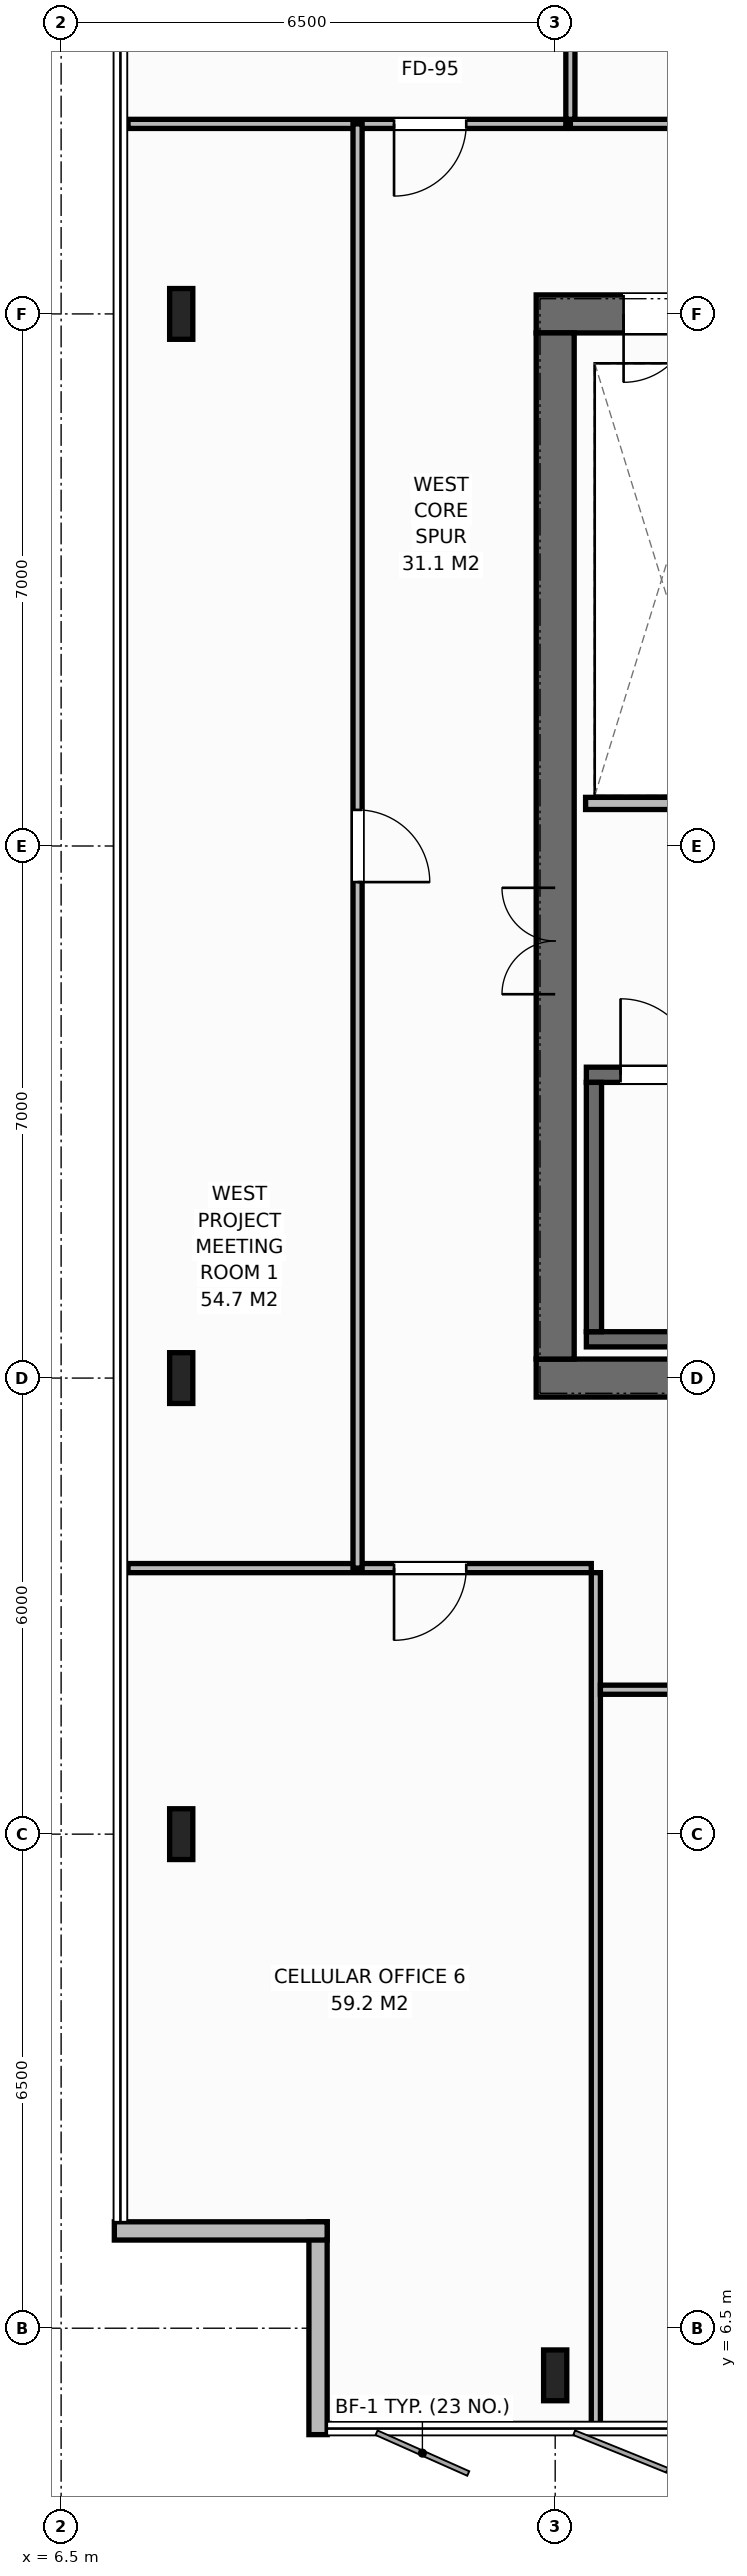
"""IFC4 building model, lengths in metres.
Left out: names, types, materials, properties, quantities, classifications, styles, units other than length and angle.
Written with IfcOpenShell. Run it as: python <this file> out.ifc"""

import sys

from ifc_helpers import new_model, si_unit, direction, frame, frame_2d, origin, origin_2d, place, context, subcontext, project, spatial, rectangle, i_section, extrude, element, fill, save


model = new_model("IFC4")
c1 = context("Model", 3, precision=1e-05, world=origin(), true_north=direction((0.0, 1.0)))
c2 = subcontext(c1, "Body", "Model", "MODEL_VIEW")
j1 = project(units=[si_unit("LENGTHUNIT", "METRE"), si_unit("PLANEANGLEUNIT", "RADIAN")], contexts=[c1])
p1 = place(None, origin())
s1 = spatial("IfcSite", under=j1, at=p1, CompositionType="ELEMENT")
p2 = place(p1, origin())
s2 = spatial("IfcBuilding", under=s1, at=p2, CompositionType="ELEMENT")
p3 = place(p2, frame((0.0, 0.0, 306.4)))
s3 = spatial("IfcBuildingStorey", under=s2, at=p3, CompositionType="ELEMENT", Elevation=306.4)
p4 = place(p3, frame((12.75, 19.0, 0.0), z_axis=(0.0, 0.0, 1.0), x_axis=(1.0, 0.0, 0.0)))
e1 = element("IfcWall", 1, at=p4, inside=s3, PredefinedType="SHEAR", context=c2, shape_type="SweptSolid", body=[
    extrude(rectangle(XDim=13.5, YDim=0.5, at=frame_2d((6.75, 0.0))), origin(), (0.0, 0.0, 1.0), 4.0),
])
p5 = place(p4, frame((9.13, 0.0, 0.0)))
e2 = element("IfcOpeningElement", 2, at=p5, cuts=e1, PredefinedType="OPENING", context=c2, shape_type="SweptSolid", body=[
    extrude(rectangle(XDim=1.4, YDim=2.2, at=frame_2d((0.7, 1.1))), frame((0.0, 0.26, 0.0), z_axis=(0.0, -1.0, 0.0), x_axis=(1.0, 0.0, 0.0)), (0.0, 0.0, 1.0), 0.52),
])
p6 = place(p3, frame((12.75, 33.0, 0.0), z_axis=(0.0, 0.0, 1.0), x_axis=(1.0, 0.0, 0.0)))
e3 = element("IfcWall", 3, at=p6, inside=s3, PredefinedType="SHEAR", context=c2, shape_type="SweptSolid", body=[
    extrude(rectangle(XDim=13.5, YDim=0.5, at=frame_2d((6.75, 0.0))), origin(), (0.0, 0.0, 1.0), 4.0),
])
p7 = place(p6, frame((1.15, 0.0, 0.0)))
e4 = element("IfcOpeningElement", 4, at=p7, cuts=e3, PredefinedType="OPENING", context=c2, shape_type="SweptSolid", body=[
    extrude(rectangle(XDim=0.9, YDim=2.15, at=frame_2d((0.45, 1.075))), frame((0.0, 0.26, 0.0), z_axis=(0.0, -1.0, 0.0), x_axis=(1.0, 0.0, 0.0)), (0.0, 0.0, 1.0), 0.52),
])
p8 = place(p6, frame((3.2, 0.0, 0.0)))
e5 = element("IfcOpeningElement", 5, at=p8, cuts=e3, PredefinedType="OPENING", context=c2, shape_type="SweptSolid", body=[
    extrude(rectangle(XDim=0.95, YDim=2.15, at=frame_2d((0.475, 1.075))), frame((0.0, 0.26, 0.0), z_axis=(0.0, -1.0, 0.0), x_axis=(1.0, 0.0, 0.0)), (0.0, 0.0, 1.0), 0.52),
])
p9 = place(p6, frame((6.05, 0.0, 0.0)))
e6 = element("IfcOpeningElement", 6, at=p9, cuts=e3, PredefinedType="OPENING", context=c2, shape_type="SweptSolid", body=[
    extrude(rectangle(XDim=0.95, YDim=2.15, at=frame_2d((0.475, 1.075))), frame((0.0, 0.26, 0.0), z_axis=(0.0, -1.0, 0.0), x_axis=(1.0, 0.0, 0.0)), (0.0, 0.0, 1.0), 0.52),
])
p10 = place(p6, frame((9.13, 0.0, 0.0)))
e7 = element("IfcOpeningElement", 7, at=p10, cuts=e3, PredefinedType="OPENING", context=c2, shape_type="SweptSolid", body=[
    extrude(rectangle(XDim=1.4, YDim=2.2, at=frame_2d((0.7, 1.1))), frame((0.0, 0.26, 0.0), z_axis=(0.0, -1.0, 0.0), x_axis=(1.0, 0.0, 0.0)), (0.0, 0.0, 1.0), 0.52),
])
p11 = place(p3, frame((13.0, 19.25, 0.0), z_axis=(0.0, 0.0, 1.0), x_axis=(0.0, 1.0, 0.0)))
e8 = element("IfcWall", 8, at=p11, inside=s3, PredefinedType="SHEAR", context=c2, shape_type="SweptSolid", body=[
    extrude(rectangle(XDim=13.5, YDim=0.5, at=frame_2d((6.75, 0.0))), origin(), (0.0, 0.0, 1.0), 4.0),
])
p12 = place(p11, frame((4.8, 0.0, 0.0)))
e9 = element("IfcOpeningElement", 9, at=p12, cuts=e8, PredefinedType="OPENING", context=c2, shape_type="SweptSolid", body=[
    extrude(rectangle(XDim=1.4, YDim=2.2, at=frame_2d((0.7, 1.1))), frame((0.0, 0.26, 0.0), z_axis=(0.0, -1.0, 0.0), x_axis=(1.0, 0.0, 0.0)), (0.0, 0.0, 1.0), 0.52),
])
p13 = place(p3, frame((13.41, 19.51, 0.0), z_axis=(0.0, 0.0, 1.0), x_axis=(1.0, 0.0, 0.0)))
e10 = element("IfcWall", 10, at=p13, inside=s3, PredefinedType="SHEAR", context=c2, shape_type="SweptSolid", body=[
    extrude(rectangle(XDim=8.43, YDim=0.2, at=frame_2d((4.215, 0.0))), origin(), (0.0, 0.0, 1.0), 4.0),
])
p14 = place(p3, frame((13.41, 22.99, 0.0), z_axis=(0.0, 0.0, 1.0), x_axis=(1.0, 0.0, 0.0)))
e11 = element("IfcWall", 11, at=p14, inside=s3, PredefinedType="SHEAR", context=c2, shape_type="SweptSolid", body=[
    extrude(rectangle(XDim=8.43, YDim=0.2, at=frame_2d((4.215, 0.0))), origin(), (0.0, 0.0, 1.0), 4.0),
])
p15 = place(p14, frame((0.45, 0.0, 0.0)))
e12 = element("IfcOpeningElement", 12, at=p15, cuts=e11, PredefinedType="OPENING", context=c2, shape_type="SweptSolid", body=[
    extrude(rectangle(XDim=1.0, YDim=2.15, at=frame_2d((0.5, 1.075))), frame((0.0, 0.11, 0.0), z_axis=(0.0, -1.0, 0.0), x_axis=(1.0, 0.0, 0.0)), (0.0, 0.0, 1.0), 0.22),
])
p16 = place(p3, frame((13.51, 19.61, 0.0), z_axis=(0.0, 0.0, 1.0), x_axis=(0.0, 1.0, 0.0)))
e13 = element("IfcWall", 13, at=p16, inside=s3, PredefinedType="SHEAR", context=c2, shape_type="SweptSolid", body=[
    extrude(rectangle(XDim=3.28, YDim=0.2, at=frame_2d((1.64, 0.0))), origin(), (0.0, 0.0, 1.0), 4.0),
])
for number, where, z_axis, x_axis in (
    (14, (13.0, 5.88, 0.0), (0.0, 0.0, 1.0), (1.0, 0.0, 0.0)),
    (15, (8.08, 13.0, 0.0), (0.0, 0.0, 1.0), (1.0, 0.0, 0.0)),
    (16, (8.08, 19.0, 0.0), (0.0, 0.0, 1.0), (1.0, 0.0, 0.0)),
    (17, (8.08, 33.0, 0.0), (0.0, 0.0, 1.0), (1.0, 0.0, 0.0)),
):
    element("IfcColumn", number, at=place(p3, frame(where, z_axis=z_axis, x_axis=x_axis)), inside=s3, PredefinedType="COLUMN", context=c2, shape_type="SweptSolid", body=[
        extrude(i_section(OverallWidth=0.305, OverallDepth=0.668, WebThickness=0.021, FlangeThickness=0.04, at=origin_2d()), origin(), (0.0, 0.0, 1.0), 4.0),
    ])
p17 = place(p3, frame((9.88, 5.1, 0.0), z_axis=(0.0, 0.0, 1.0), x_axis=(0.0, 1.0, 0.0)))
e18 = element("IfcWall", 18, at=p17, inside=s3, PredefinedType="STANDARD", context=c2, shape_type="SweptSolid", body=[
    extrude(rectangle(XDim=2.8, YDim=0.24, at=frame_2d((1.4, 0.0))), origin(), (0.0, 0.0, 1.0), 3.72),
])
p18 = place(p3, frame((10.0, 7.78, 0.0), z_axis=(0.0, 0.0, 1.0), x_axis=(-1.0, 0.0, 0.0)))
e19 = element("IfcWall", 19, at=p18, inside=s3, PredefinedType="STANDARD", context=c2, shape_type="SweptSolid", body=[
    extrude(rectangle(XDim=2.8, YDim=0.24, at=frame_2d((1.4, 0.0))), origin(), (0.0, 0.0, 1.0), 3.72),
])
p19 = place(p3, frame((13.4, 26.56, 0.0), z_axis=(0.0, 0.0, 1.0), x_axis=(1.0, 0.0, 0.0)))
e20 = element("IfcWall", 20, at=p19, inside=s3, PredefinedType="STANDARD", context=c2, shape_type="SweptSolid", body=[
    extrude(rectangle(XDim=8.34, YDim=0.16, at=frame_2d((4.17, 0.0))), origin(), (0.0, 0.0, 1.0), 3.72),
])
p20 = place(p3, frame((13.2, 35.5, 0.0), z_axis=(0.0, 0.0, 1.0), x_axis=(1.0, 0.0, 0.0)))
e21 = element("IfcWall", 21, at=p20, inside=s3, PredefinedType="PARTITIONING", context=c2, shape_type="SweptSolid", body=[
    extrude(rectangle(XDim=13.16, YDim=0.12, at=frame_2d((6.58, 0.0))), origin(), (0.0, 0.0, 1.0), 3.72),
])
p21 = place(p20, frame((1.35, 0.0, 0.0)))
e22 = element("IfcOpeningElement", 22, at=p21, cuts=e21, PredefinedType="OPENING", context=c2, shape_type="SweptSolid", body=[
    extrude(rectangle(XDim=0.9, YDim=2.15, at=frame_2d((0.45, 1.075))), frame((0.0, 0.07, 0.0), z_axis=(0.0, -1.0, 0.0), x_axis=(1.0, 0.0, 0.0)), (0.0, 0.0, 1.0), 0.14),
])
p22 = place(p20, frame((4.05, 0.0, 0.0)))
e23 = element("IfcOpeningElement", 23, at=p22, cuts=e21, PredefinedType="OPENING", context=c2, shape_type="SweptSolid", body=[
    extrude(rectangle(XDim=0.9, YDim=2.15, at=frame_2d((0.45, 1.075))), frame((0.0, 0.07, 0.0), z_axis=(0.0, -1.0, 0.0), x_axis=(1.0, 0.0, 0.0)), (0.0, 0.0, 1.0), 0.14),
])
p23 = place(p20, frame((8.25, 0.0, 0.0)))
e24 = element("IfcOpeningElement", 24, at=p23, cuts=e21, PredefinedType="OPENING", context=c2, shape_type="SweptSolid", body=[
    extrude(rectangle(XDim=0.9, YDim=2.15, at=frame_2d((0.45, 1.075))), frame((0.0, 0.07, 0.0), z_axis=(0.0, -1.0, 0.0), x_axis=(1.0, 0.0, 0.0)), (0.0, 0.0, 1.0), 0.14),
])
p24 = place(p20, frame((11.0, 0.0, 0.0)))
e25 = element("IfcOpeningElement", 25, at=p24, cuts=e21, PredefinedType="OPENING", context=c2, shape_type="SweptSolid", body=[
    extrude(rectangle(XDim=0.95, YDim=2.15, at=frame_2d((0.475, 1.075))), frame((0.0, 0.07, 0.0), z_axis=(0.0, -1.0, 0.0), x_axis=(1.0, 0.0, 0.0)), (0.0, 0.0, 1.0), 0.14),
])
p25 = place(p3, frame((13.2, 35.56, 0.0), z_axis=(0.0, 0.0, 1.0), x_axis=(0.0, 1.0, 0.0)))
e26 = element("IfcWall", 26, at=p25, inside=s3, PredefinedType="PARTITIONING", context=c2, shape_type="SweptSolid", body=[
    extrude(rectangle(XDim=11.32, YDim=0.12, at=frame_2d((5.66, 0.0))), origin(), (0.0, 0.0, 1.0), 2.712),
])
p26 = place(p3, frame((7.38, 35.5, 0.0), z_axis=(0.0, 0.0, 1.0), x_axis=(1.0, 0.0, 0.0)))
e27 = element("IfcWall", 27, at=p26, inside=s3, PredefinedType="PARTITIONING", context=c2, shape_type="SweptSolid", body=[
    extrude(rectangle(XDim=5.76, YDim=0.12, at=frame_2d((2.88, 0.0))), origin(), (0.0, 0.0, 1.0), 3.72),
])
p27 = place(p26, frame((3.5, 0.0, 0.0)))
e28 = element("IfcOpeningElement", 28, at=p27, cuts=e27, PredefinedType="OPENING", context=c2, shape_type="SweptSolid", body=[
    extrude(rectangle(XDim=0.95, YDim=2.15, at=frame_2d((0.475, 1.075))), frame((0.0, 0.07, 0.0), z_axis=(0.0, -1.0, 0.0), x_axis=(1.0, 0.0, 0.0)), (0.0, 0.0, 1.0), 0.14),
])
p28 = place(p3, frame((13.535, 5.12, 0.0), z_axis=(0.0, 0.0, 1.0), x_axis=(0.0, 1.0, 0.0)))
e29 = element("IfcWall", 29, at=p28, inside=s3, PredefinedType="PARTITIONING", context=c2, shape_type="SweptSolid", body=[
    extrude(rectangle(XDim=11.32, YDim=0.12, at=frame_2d((5.66, 0.0))), origin(), (0.0, 0.0, 1.0), 3.72),
])
p29 = place(p3, frame((7.38, 16.5, 0.0), z_axis=(0.0, 0.0, 1.0), x_axis=(1.0, 0.0, 0.0)))
e30 = element("IfcWall", 30, at=p29, inside=s3, PredefinedType="PARTITIONING", context=c2, shape_type="SweptSolid", body=[
    extrude(rectangle(XDim=6.095, YDim=0.12, at=frame_2d((3.048, 0.0))), origin(), (0.0, 0.0, 1.0), 3.72),
])
p30 = place(p29, frame((3.5, 0.0, 0.0)))
e31 = element("IfcOpeningElement", 31, at=p30, cuts=e30, PredefinedType="OPENING", context=c2, shape_type="SweptSolid", body=[
    extrude(rectangle(XDim=0.95, YDim=2.15, at=frame_2d((0.475, 1.075))), frame((0.0, 0.07, 0.0), z_axis=(0.0, -1.0, 0.0), x_axis=(1.0, 0.0, 0.0)), (0.0, 0.0, 1.0), 0.14),
])
p31 = place(p3, frame((13.595, 14.9, 0.0), z_axis=(0.0, 0.0, 1.0), x_axis=(1.0, 0.0, 0.0)))
e32 = element("IfcWall", 32, at=p31, inside=s3, PredefinedType="PARTITIONING", context=c2, shape_type="SweptSolid", body=[
    extrude(rectangle(XDim=4.578, YDim=0.12, at=frame_2d((2.289, 0.0))), origin(), (0.0, 0.0, 1.0), 3.72),
])
p32 = place(p31, frame((1.814, 0.0, 0.0)))
e33 = element("IfcOpeningElement", 33, at=p32, cuts=e32, PredefinedType="OPENING", context=c2, shape_type="SweptSolid", body=[
    extrude(rectangle(XDim=0.95, YDim=2.15, at=frame_2d((0.475, 1.075))), frame((0.0, 0.07, 0.0), z_axis=(0.0, -1.0, 0.0), x_axis=(1.0, 0.0, 0.0)), (0.0, 0.0, 1.0), 0.14),
])
p33 = place(p3, frame((10.4, 16.5, 0.0), z_axis=(0.0, 0.0, 1.0), x_axis=(0.0, 1.0, 0.0)))
e34 = element("IfcWall", 34, at=p33, inside=s3, PredefinedType="PARTITIONING", context=c2, shape_type="SweptSolid", body=[
    extrude(rectangle(XDim=19.0, YDim=0.12, at=frame_2d((9.5, 0.0))), origin(), (0.0, 0.0, 1.0), 3.72),
])
p34 = place(p33, frame((9.025, 0.0, 0.0)))
e35 = element("IfcOpeningElement", 35, at=p34, cuts=e34, PredefinedType="OPENING", context=c2, shape_type="SweptSolid", body=[
    extrude(rectangle(XDim=0.95, YDim=2.15, at=frame_2d((0.475, 1.075))), frame((0.0, 0.07, 0.0), z_axis=(0.0, -1.0, 0.0), x_axis=(1.0, 0.0, 0.0)), (0.0, 0.0, 1.0), 0.14),
])
p35 = place(p15, origin())
e36 = element("IfcDoor", 36, at=p35, inside=s3, OperationType="SINGLE_SWING_LEFT", PredefinedType="DOOR", context=c2, shape_type="SweptSolid", body=[
    extrude(rectangle(XDim=1.0, YDim=2.15, at=frame_2d((0.5, 1.075))), frame((0.0, 0.025, 0.0), z_axis=(0.0, -1.0, 0.0), x_axis=(1.0, 0.0, 0.0)), (0.0, 0.0, 1.0), 0.05),
])
fill(e12, e36)
p36 = place(p12, origin())
e37 = element("IfcDoor", 37, at=p36, inside=s3, OperationType="DOUBLE_DOOR_SINGLE_SWING", PredefinedType="DOOR", context=c2, shape_type="SweptSolid", body=[
    extrude(rectangle(XDim=1.4, YDim=2.2, at=frame_2d((0.7, 1.1))), frame((0.0, 0.025, 0.0), z_axis=(0.0, -1.0, 0.0), x_axis=(1.0, 0.0, 0.0)), (0.0, 0.0, 1.0), 0.05),
])
fill(e9, e37)
p37 = place(p7, origin())
e38 = element("IfcDoor", 38, at=p37, inside=s3, OperationType="SINGLE_SWING_RIGHT", PredefinedType="DOOR", context=c2, shape_type="SweptSolid", body=[
    extrude(rectangle(XDim=0.9, YDim=2.15, at=frame_2d((0.45, 1.075))), frame((0.0, -0.025, 0.0), z_axis=(0.0, -1.0, 0.0), x_axis=(1.0, 0.0, 0.0)), (0.0, 0.0, 1.0), 0.05),
])
fill(e4, e38)
p38 = place(p27, origin())
e39 = element("IfcDoor", 39, at=p38, inside=s3, OperationType="SINGLE_SWING_RIGHT", PredefinedType="DOOR", context=c2, shape_type="SweptSolid", body=[
    extrude(rectangle(XDim=0.95, YDim=2.15, at=frame_2d((0.475, 1.075))), frame((0.0, 0.025, 0.0), z_axis=(0.0, -1.0, 0.0), x_axis=(1.0, 0.0, 0.0)), (0.0, 0.0, 1.0), 0.05),
])
fill(e28, e39)
p39 = place(p30, origin())
e40 = element("IfcDoor", 40, at=p39, inside=s3, OperationType="SINGLE_SWING_RIGHT", PredefinedType="DOOR", context=c2, shape_type="SweptSolid", body=[
    extrude(rectangle(XDim=0.95, YDim=2.15, at=frame_2d((0.475, 1.075))), frame((0.0, 0.025, 0.0), z_axis=(0.0, -1.0, 0.0), x_axis=(1.0, 0.0, 0.0)), (0.0, 0.0, 1.0), 0.05),
])
fill(e31, e40)
p40 = place(p34, origin())
e41 = element("IfcDoor", 41, at=p40, inside=s3, OperationType="SINGLE_SWING_RIGHT", PredefinedType="DOOR", context=c2, shape_type="SweptSolid", body=[
    extrude(rectangle(XDim=0.95, YDim=2.15, at=frame_2d((0.475, 1.075))), frame((0.0, 0.025, 0.0), z_axis=(0.0, -1.0, 0.0), x_axis=(1.0, 0.0, 0.0)), (0.0, 0.0, 1.0), 0.05),
])
fill(e35, e41)
save(model, sys.argv[1])
